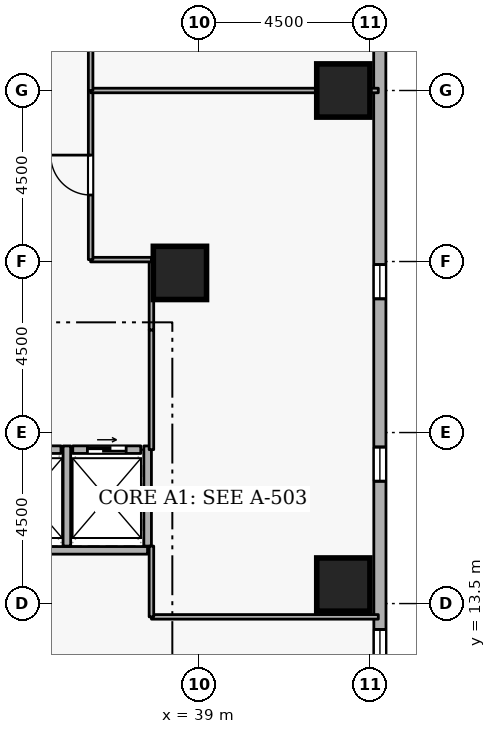
"""IFC4 building model, lengths in metres.
Left out: names, types, materials, properties, quantities, classifications, styles, units other than length and angle.
Written with IfcOpenShell. Run it as: python <this file> out.ifc"""

import sys

from ifc_helpers import new_model, si_unit, direction, frame, frame_2d, origin, origin_2d, place, context, subcontext, project, spatial, rectangle, extrude, element, fill, save


model = new_model("IFC4")
c1 = context("Model", 3, precision=1e-05, world=origin(), true_north=direction((0.0, 1.0)))
c2 = subcontext(c1, "Body", "Model", "MODEL_VIEW")
j1 = project(units=[si_unit("LENGTHUNIT", "METRE"), si_unit("PLANEANGLEUNIT", "RADIAN")], contexts=[c1])
p1 = place(None, origin())
s1 = spatial("IfcSite", under=j1, at=p1, CompositionType="ELEMENT")
p2 = place(p1, origin())
s2 = spatial("IfcBuilding", under=s1, at=p2, CompositionType="ELEMENT")
p3 = place(p2, frame((0.0, 0.0, 35.1)))
s3 = spatial("IfcBuildingStorey", under=s2, at=p3, CompositionType="ELEMENT", Elevation=35.1)
for number, where, z_axis, x_axis in (
    (1, (42.8, 14.0, 0.0), (0.0, 0.0, 1.0), (1.0, 0.0, 0.0)),
    (2, (42.8, 27.0, 0.0), (0.0, 0.0, 1.0), (1.0, 0.0, 0.0)),
    (3, (38.5, 22.2, 0.0), (0.0, 0.0, 1.0), (1.0, 0.0, 0.0)),
):
    element("IfcColumn", number, at=place(p3, frame(where, z_axis=z_axis, x_axis=x_axis)), inside=s3, PredefinedType="COLUMN", context=c2, shape_type="SweptSolid", body=[
        extrude(rectangle(XDim=1.4, YDim=1.4, at=origin_2d()), origin(), (0.0, 0.0, 1.0), 3.6),
    ])
p4 = place(p3, frame((43.765, 5.319, 0.0), z_axis=(0.0, 0.0, 1.0), x_axis=(-0.000276554545, 0.999999961759, 0.0)))
e4 = element("IfcWall", 4, at=p4, inside=s3, PredefinedType="STANDARD", context=c2, shape_type="SweptSolid", body=[
    extrude(rectangle(XDim=34.429, YDim=0.32, at=frame_2d((17.214, 0.0))), origin(), (0.0, 0.0, 1.0), 2.7),
])
p5 = place(p4, frame((1.8, 0.0, 0.72)))
e5 = element("IfcOpeningElement", 5, at=p5, cuts=e4, PredefinedType="OPENING", context=c2, shape_type="SweptSolid", body=[
    extrude(rectangle(XDim=0.9, YDim=1.75, at=frame_2d((0.45, 0.875))), frame((0.0, 0.17, 0.0), z_axis=(0.0, -1.0, 0.0), x_axis=(1.0, 0.0, 0.0)), (0.0, 0.0, 1.0), 0.34),
])
p6 = place(p4, frame((6.6, 0.0, 0.72)))
e6 = element("IfcOpeningElement", 6, at=p6, cuts=e4, PredefinedType="OPENING", context=c2, shape_type="SweptSolid", body=[
    extrude(rectangle(XDim=0.9, YDim=1.75, at=frame_2d((0.45, 0.875))), frame((0.0, 0.17, 0.0), z_axis=(0.0, -1.0, 0.0), x_axis=(1.0, 0.0, 0.0)), (0.0, 0.0, 1.0), 0.34),
])
p7 = place(p4, frame((11.4, 0.0, 0.72)))
e7 = element("IfcOpeningElement", 7, at=p7, cuts=e4, PredefinedType="OPENING", context=c2, shape_type="SweptSolid", body=[
    extrude(rectangle(XDim=0.9, YDim=1.75, at=frame_2d((0.45, 0.875))), frame((0.0, 0.17, 0.0), z_axis=(0.0, -1.0, 0.0), x_axis=(1.0, 0.0, 0.0)), (0.0, 0.0, 1.0), 0.34),
])
p8 = place(p4, frame((16.2, 0.0, 0.72)))
e8 = element("IfcOpeningElement", 8, at=p8, cuts=e4, PredefinedType="OPENING", context=c2, shape_type="SweptSolid", body=[
    extrude(rectangle(XDim=0.9, YDim=1.75, at=frame_2d((0.45, 0.875))), frame((0.0, 0.17, 0.0), z_axis=(0.0, -1.0, 0.0), x_axis=(1.0, 0.0, 0.0)), (0.0, 0.0, 1.0), 0.34),
])
p9 = place(p4, frame((25.8, 0.0, 0.72)))
e9 = element("IfcOpeningElement", 9, at=p9, cuts=e4, PredefinedType="OPENING", context=c2, shape_type="SweptSolid", body=[
    extrude(rectangle(XDim=0.9, YDim=1.75, at=frame_2d((0.45, 0.875))), frame((0.0, 0.17, 0.0), z_axis=(0.0, -1.0, 0.0), x_axis=(1.0, 0.0, 0.0)), (0.0, 0.0, 1.0), 0.34),
])
p10 = place(p4, frame((30.6, 0.0, 0.72)))
e10 = element("IfcOpeningElement", 10, at=p10, cuts=e4, PredefinedType="OPENING", context=c2, shape_type="SweptSolid", body=[
    extrude(rectangle(XDim=0.9, YDim=1.75, at=frame_2d((0.45, 0.875))), frame((0.0, 0.17, 0.0), z_axis=(0.0, -1.0, 0.0), x_axis=(1.0, 0.0, 0.0)), (0.0, 0.0, 1.0), 0.34),
])
p11 = place(p3, frame((33.63, 17.55, 0.0), z_axis=(0.0, 0.0, 1.0), x_axis=(1.0, 0.0, 0.0)))
e11 = element("IfcWall", 11, at=p11, inside=s3, PredefinedType="STANDARD", context=c2, shape_type="SweptSolid", body=[
    extrude(rectangle(XDim=1.74, YDim=0.2, at=frame_2d((0.87, 0.0))), origin(), (0.0, 0.0, 1.0), 3.34),
])
p12 = place(p11, frame((0.36, 0.0, 0.0)))
e12 = element("IfcOpeningElement", 12, at=p12, cuts=e11, PredefinedType="OPENING", context=c2, shape_type="SweptSolid", body=[
    extrude(rectangle(XDim=1.02, YDim=2.06, at=frame_2d((0.51, 1.03))), frame((0.0, 0.11, 0.0), z_axis=(0.0, -1.0, 0.0), x_axis=(1.0, 0.0, 0.0)), (0.0, 0.0, 1.0), 0.22),
])
p13 = place(p3, frame((35.68, 17.55, 0.0), z_axis=(0.0, 0.0, 1.0), x_axis=(1.0, 0.0, 0.0)))
e13 = element("IfcWall", 13, at=p13, inside=s3, PredefinedType="STANDARD", context=c2, shape_type="SweptSolid", body=[
    extrude(rectangle(XDim=1.79, YDim=0.2, at=frame_2d((0.895, 0.0))), origin(), (0.0, 0.0, 1.0), 3.34),
])
p14 = place(p13, frame((0.385, 0.0, 0.0)))
e14 = element("IfcOpeningElement", 14, at=p14, cuts=e13, PredefinedType="OPENING", context=c2, shape_type="SweptSolid", body=[
    extrude(rectangle(XDim=1.02, YDim=2.06, at=frame_2d((0.51, 1.03))), frame((0.0, 0.11, 0.0), z_axis=(0.0, -1.0, 0.0), x_axis=(1.0, 0.0, 0.0)), (0.0, 0.0, 1.0), 0.22),
])
p15 = place(p3, frame((33.452, 14.9, 0.0), z_axis=(0.0, 0.0, 1.0), x_axis=(1.0, 0.0, 0.0)))
e15 = element("IfcWall", 15, at=p15, inside=s3, PredefinedType="STANDARD", context=c2, shape_type="SweptSolid", body=[
    extrude(rectangle(XDim=4.196, YDim=0.2, at=frame_2d((2.098, 0.0))), origin(), (0.0, 0.0, 1.0), 3.34),
])
for number, where, z_axis, x_axis in (
    (16, (35.525, 15.012, 0.0), (0.0, 0.0, 1.0), (0.0, 1.0, 0.0)),
    (17, (37.65, 15.012, 0.0), (0.0, 0.0, 1.0), (0.0, 1.0, 0.0)),
):
    element("IfcWall", number, at=place(p3, frame(where, z_axis=z_axis, x_axis=x_axis)), inside=s3, PredefinedType="STANDARD", context=c2, shape_type="SweptSolid", body=[
        extrude(rectangle(XDim=2.636, YDim=0.2, at=frame_2d((1.318, 0.0))), origin(), (0.0, 0.0, 1.0), 3.34),
    ])
p16 = place(p3, frame((37.75, 17.55, 0.0), z_axis=(0.0, 0.0, 1.0), x_axis=(0.0, 1.0, 0.0)))
e18 = element("IfcWall", 18, at=p16, inside=s3, PredefinedType="PARTITIONING", context=c2, shape_type="SweptSolid", body=[
    extrude(rectangle(XDim=3.15, YDim=0.12, at=frame_2d((1.575, 0.0))), origin(), (0.0, 0.0, 1.0), 3.34),
])
p17 = place(p3, frame((37.75, 20.7, 0.0), z_axis=(0.0, 0.0, 1.0), x_axis=(0.0, 1.0, 0.0)))
e19 = element("IfcWall", 19, at=p17, inside=s3, PredefinedType="PARTITIONING", context=c2, shape_type="SweptSolid", body=[
    extrude(rectangle(XDim=1.85, YDim=0.12, at=frame_2d((0.925, 0.0))), origin(), (0.0, 0.0, 1.0), 3.34),
])
p18 = place(p3, frame((37.75, 22.55, 0.0), z_axis=(0.0, 0.0, 1.0), x_axis=(-1.0, 0.0, 0.0)))
e20 = element("IfcWall", 20, at=p18, inside=s3, PredefinedType="PARTITIONING", context=c2, shape_type="SweptSolid", body=[
    extrude(rectangle(XDim=1.6, YDim=0.12, at=frame_2d((0.8, 0.0))), origin(), (0.0, 0.0, 1.0), 3.34),
])
p19 = place(p3, frame((36.15, 22.55, 0.0), z_axis=(0.0, 0.0, 1.0), x_axis=(0.0, 1.0, 0.0)))
e21 = element("IfcWall", 21, at=p19, inside=s3, PredefinedType="PARTITIONING", context=c2, shape_type="SweptSolid", body=[
    extrude(rectangle(XDim=4.45, YDim=0.12, at=frame_2d((2.225, 0.0))), origin(), (0.0, 0.0, 1.0), 3.34),
])
p20 = place(p19, frame((1.7, 0.0, 0.0)))
e22 = element("IfcOpeningElement", 22, at=p20, cuts=e21, PredefinedType="OPENING", context=c2, shape_type="SweptSolid", body=[
    extrude(rectangle(XDim=1.05, YDim=2.1, at=frame_2d((0.525, 1.05))), frame((0.0, 0.07, 0.0), z_axis=(0.0, -1.0, 0.0), x_axis=(1.0, 0.0, 0.0)), (0.0, 0.0, 1.0), 0.14),
])
p21 = place(p3, frame((36.15, 27.0, 0.0), z_axis=(0.0, 0.0, 1.0), x_axis=(1.0, 0.0, 0.0)))
e23 = element("IfcWall", 23, at=p21, inside=s3, PredefinedType="PARTITIONING", context=c2, shape_type="SweptSolid", body=[
    extrude(rectangle(XDim=7.57, YDim=0.12, at=frame_2d((3.785, 0.0))), origin(), (0.0, 0.0, 1.0), 2.878),
])
p22 = place(p3, frame((43.72, 13.15, 0.0), z_axis=(0.0, 0.0, 1.0), x_axis=(-1.0, 0.0, 0.0)))
e24 = element("IfcWall", 24, at=p22, inside=s3, PredefinedType="PARTITIONING", context=c2, shape_type="SweptSolid", body=[
    extrude(rectangle(XDim=5.97, YDim=0.12, at=frame_2d((2.985, 0.0))), origin(), (0.0, 0.0, 1.0), 3.34),
])
p23 = place(p3, frame((37.75, 13.15, 0.0), z_axis=(0.0, 0.0, 1.0), x_axis=(0.0, 1.0, 0.0)))
e25 = element("IfcWall", 25, at=p23, inside=s3, PredefinedType="PARTITIONING", context=c2, shape_type="SweptSolid", body=[
    extrude(rectangle(XDim=1.862, YDim=0.12, at=frame_2d((0.931, 0.0))), origin(), (0.0, 0.0, 1.0), 3.34),
])
p24 = place(p3, frame((36.15, 27.0, 0.0), z_axis=(0.0, 0.0, 1.0), x_axis=(0.0, 1.0, 0.0)))
e26 = element("IfcWall", 26, at=p24, inside=s3, PredefinedType="PARTITIONING", context=c2, shape_type="SweptSolid", body=[
    extrude(rectangle(XDim=4.45, YDim=0.12, at=frame_2d((2.225, 0.0))), origin(), (0.0, 0.0, 1.0), 3.34),
])
p25 = place(p24, frame((1.7, 0.0, 0.0)))
e27 = element("IfcOpeningElement", 27, at=p25, cuts=e26, PredefinedType="OPENING", context=c2, shape_type="SweptSolid", body=[
    extrude(rectangle(XDim=1.05, YDim=2.1, at=frame_2d((0.525, 1.05))), frame((0.0, 0.07, 0.0), z_axis=(0.0, -1.0, 0.0), x_axis=(1.0, 0.0, 0.0)), (0.0, 0.0, 1.0), 0.14),
])
p26 = place(p6, origin())
e28 = element("IfcWindow", 28, at=p26, inside=s3, PartitioningType="SINGLE_PANEL", PredefinedType="WINDOW", context=c2, shape_type="SweptSolid", body=[
    extrude(rectangle(XDim=0.9, YDim=1.75, at=frame_2d((0.45, 0.875))), frame((0.0, 0.03, 0.0), z_axis=(0.0, -1.0, 0.0), x_axis=(1.0, 0.0, 0.0)), (0.0, 0.0, 1.0), 0.06),
])
fill(e6, e28)
p27 = place(p7, origin())
e29 = element("IfcWindow", 29, at=p27, inside=s3, PartitioningType="SINGLE_PANEL", PredefinedType="WINDOW", context=c2, shape_type="SweptSolid", body=[
    extrude(rectangle(XDim=0.9, YDim=1.75, at=frame_2d((0.45, 0.875))), frame((0.0, 0.03, 0.0), z_axis=(0.0, -1.0, 0.0), x_axis=(1.0, 0.0, 0.0)), (0.0, 0.0, 1.0), 0.06),
])
fill(e7, e29)
p28 = place(p8, origin())
e30 = element("IfcWindow", 30, at=p28, inside=s3, PartitioningType="SINGLE_PANEL", PredefinedType="WINDOW", context=c2, shape_type="SweptSolid", body=[
    extrude(rectangle(XDim=0.9, YDim=1.75, at=frame_2d((0.45, 0.875))), frame((0.0, 0.03, 0.0), z_axis=(0.0, -1.0, 0.0), x_axis=(1.0, 0.0, 0.0)), (0.0, 0.0, 1.0), 0.06),
])
fill(e8, e30)
p29 = place(p14, origin())
e31 = element("IfcDoor", 31, at=p29, inside=s3, OperationType="SLIDING_TO_LEFT", PredefinedType="DOOR", context=c2, shape_type="SweptSolid", body=[
    extrude(rectangle(XDim=1.02, YDim=2.06, at=frame_2d((0.51, 1.03))), frame((0.0, 0.025, 0.0), z_axis=(0.0, -1.0, 0.0), x_axis=(1.0, 0.0, 0.0)), (0.0, 0.0, 1.0), 0.05),
])
fill(e14, e31)
p30 = place(p20, origin())
e32 = element("IfcDoor", 32, at=p30, inside=s3, OperationType="SINGLE_SWING_RIGHT", PredefinedType="DOOR", context=c2, shape_type="SweptSolid", body=[
    extrude(rectangle(XDim=1.05, YDim=2.1, at=frame_2d((0.525, 1.05))), frame((0.0, 0.025, 0.0), z_axis=(0.0, -1.0, 0.0), x_axis=(1.0, 0.0, 0.0)), (0.0, 0.0, 1.0), 0.05),
])
fill(e22, e32)
save(model, sys.argv[1])
